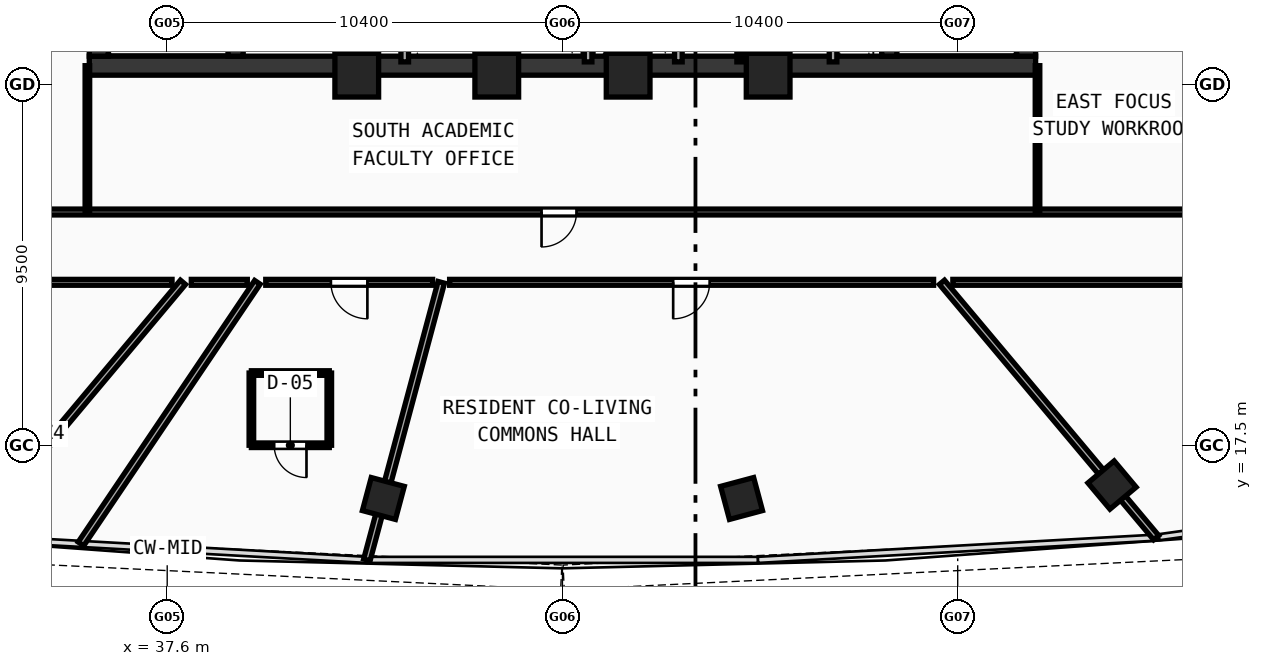
"""IFC4 building model, lengths in metres.
Left out: names, types, materials, properties, quantities, classifications, styles, units other than length and angle.
Written with IfcOpenShell. Run it as: python <this file> out.ifc"""

import sys

from ifc_helpers import new_model, si_unit, direction, frame, frame_2d, origin, origin_with_axes, origin_2d, place, context, subcontext, project, spatial, rectangle, hollow_rectangle, extrude, source, transform, mapped, element, fill, save


model = new_model("IFC4")
c1 = context("Model", 3, precision=1e-05, world=origin(), true_north=direction((0.0, 1.0)))
c2 = subcontext(c1, "Body", "Model", "MODEL_VIEW")
j1 = project(units=[si_unit("LENGTHUNIT", "METRE"), si_unit("PLANEANGLEUNIT", "RADIAN")], contexts=[c1])
p1 = place(None, origin())
s1 = spatial("IfcSite", under=j1, at=p1, CompositionType="ELEMENT")
p2 = place(p1, origin())
s2 = spatial("IfcBuilding", under=s1, at=p2, CompositionType="ELEMENT")
p3 = place(p2, frame((0.0, 0.0, 203.76)))
s3 = spatial("IfcBuildingStorey", under=s2, at=p3, CompositionType="ELEMENT", Elevation=203.76)
p4 = place(p3, frame((35.55, 27.5, 0.0), z_axis=(0.0, 0.0, 1.0), x_axis=(1.0, 0.0, 0.0)))
e1 = element("IfcWall", 1, at=p4, inside=s3, PredefinedType="SHEAR", context=c2, shape_type="SweptSolid", body=[
    extrude(rectangle(XDim=24.9, YDim=0.5, at=frame_2d((12.45, 0.0))), origin(), (0.0, 0.0, 1.0), 3.54),
])
for number, where, z_axis, x_axis in (
    (2, (35.8, 27.75, 0.0), (0.0, 0.0, 1.0), (0.0, 1.0, 0.0)),
    (3, (60.2, 27.75, 0.0), (0.0, 0.0, 1.0), (0.0, 1.0, 0.0)),
):
    element("IfcWall", number, at=place(p3, frame(where, z_axis=z_axis, x_axis=x_axis)), inside=s3, PredefinedType="SHEAR", context=c2, shape_type="SweptSolid", body=[
        extrude(rectangle(XDim=12.2, YDim=0.5, at=frame_2d((6.1, 0.0))), origin(), (0.0, 0.0, 1.0), 3.54),
    ])
p5 = place(p3, frame((39.4, 27.75, 0.0), z_axis=(0.0, 0.0, 1.0), x_axis=(0.0, 1.0, 0.0)))
e4 = element("IfcWall", 4, at=p5, inside=s3, PredefinedType="SHEAR", context=c2, shape_type="SweptSolid", body=[
    extrude(rectangle(XDim=12.2, YDim=0.4, at=frame_2d((6.1, 0.0))), origin(), (0.0, 0.0, 1.0), 3.54),
])
p6 = place(p5, frame((10.0, 0.0, 0.0)))
e5 = element("IfcOpeningElement", 5, at=p6, cuts=e4, PredefinedType="OPENING", context=c2, shape_type="SweptSolid", body=[
    extrude(rectangle(XDim=1.1, YDim=2.1, at=frame_2d((0.55, 1.05))), frame((0.0, 0.21, 0.0), z_axis=(0.0, -1.0, 0.0), x_axis=(1.0, 0.0, 0.0)), (0.0, 0.0, 1.0), 0.42),
])
p7 = place(p3, frame((56.6, 27.75, 0.0), z_axis=(0.0, 0.0, 1.0), x_axis=(0.0, 1.0, 0.0)))
e6 = element("IfcWall", 6, at=p7, inside=s3, PredefinedType="SHEAR", context=c2, shape_type="SweptSolid", body=[
    extrude(rectangle(XDim=12.2, YDim=0.4, at=frame_2d((6.1, 0.0))), origin(), (0.0, 0.0, 1.0), 3.54),
])
p8 = place(p7, frame((10.0, 0.0, 0.0)))
e7 = element("IfcOpeningElement", 7, at=p8, cuts=e6, PredefinedType="OPENING", context=c2, shape_type="SweptSolid", body=[
    extrude(rectangle(XDim=1.1, YDim=2.1, at=frame_2d((0.55, 1.05))), frame((0.0, 0.21, 0.0), z_axis=(0.0, -1.0, 0.0), x_axis=(1.0, 0.0, 0.0)), (0.0, 0.0, 1.0), 0.42),
])
m1 = source(origin(), c2, "Body", "SweptSolid", [
    extrude(hollow_rectangle(XDim=1.15, YDim=1.15, WallThickness=0.048, at=origin_2d()), origin(), (0.0, 0.0, 1.0), 3.8),
])
for number, where, z_axis, x_axis in (
    (8, (42.588, 27.25, -0.26), (0.0, 0.0, 1.0), (1.0, 0.0, 0.0)),
    (9, (46.272, 27.25, -0.26), (0.0, 0.0, 1.0), (1.0, 0.0, 0.0)),
    (10, (49.729, 27.25, -0.26), (0.0, 0.0, 1.0), (1.0, 0.0, 0.0)),
    (11, (53.412, 27.25, -0.26), (0.0, 0.0, 1.0), (1.0, 0.0, 0.0)),
):
    element("IfcColumn", number, at=place(p3, frame(where, z_axis=z_axis, x_axis=x_axis)), inside=s3, PredefinedType="COLUMN", context=c2, shape_type="MappedRepresentation", body=[
        mapped(m1, transform((0.0, 0.0, 0.0), scale=1.0)),
    ])
m2 = source(origin(), c2, "Body", "SweptSolid", [
    extrude(hollow_rectangle(XDim=0.9, YDim=0.9, WallThickness=0.036, at=origin_2d()), origin(), (0.0, 0.0, 1.0), 3.8),
])
for number, where, z_axis, x_axis in (
    (12, (43.288, 16.112, -0.26), (0.0, 0.0, 1.0), (0.966, -0.259, 0.0)),
    (13, (52.713, 16.112, -0.26), (0.0, 0.0, 1.0), (0.966, 0.259, 0.0)),
    (14, (62.461, 16.466, -0.26), (0.0, 0.0, 1.0), (0.766, 0.643, 0.0)),
):
    element("IfcColumn", number, at=place(p3, frame(where, z_axis=z_axis, x_axis=x_axis)), inside=s3, PredefinedType="COLUMN", context=c2, shape_type="MappedRepresentation", body=[
        mapped(m2, transform((0.0, 0.0, 0.0), scale=1.0)),
    ])
p9 = place(p3, frame((43.85, 27.6, 0.0), z_axis=(0.0, 0.0, 1.0), x_axis=(0.0, 1.0, 0.0)))
e15 = element("IfcWall", 15, at=p9, inside=s3, PredefinedType="SOLIDWALL", context=c2, shape_type="SweptSolid", body=[
    extrude(rectangle(XDim=6.22, YDim=0.2, at=frame_2d((3.11, 0.0))), origin(), (0.0, 0.0, 1.0), 3.54),
])
p10 = place(p9, frame((2.25, 0.0, 0.0)))
e16 = element("IfcOpeningElement", 16, at=p10, cuts=e15, PredefinedType="OPENING", context=c2, shape_type="SweptSolid", body=[
    extrude(rectangle(XDim=1.05, YDim=2.1, at=frame_2d((0.525, 1.05))), frame((0.0, 0.11, 0.0), z_axis=(0.0, -1.0, 0.0), x_axis=(1.0, 0.0, 0.0)), (0.0, 0.0, 1.0), 0.22),
])
p11 = place(p3, frame((53.68, 27.6, 0.0), z_axis=(0.0, 0.0, 1.0), x_axis=(0.0, 1.0, 0.0)))
e17 = element("IfcWall", 17, at=p11, inside=s3, PredefinedType="SOLIDWALL", context=c2, shape_type="SweptSolid", body=[
    extrude(rectangle(XDim=9.05, YDim=0.2, at=frame_2d((4.525, 0.0))), origin(), (0.0, 0.0, 1.0), 3.54),
])
p12 = place(p11, frame((6.9, 0.0, 0.0)))
e18 = element("IfcOpeningElement", 18, at=p12, cuts=e17, PredefinedType="OPENING", context=c2, shape_type="SweptSolid", body=[
    extrude(rectangle(XDim=1.05, YDim=2.1, at=frame_2d((0.525, 1.05))), frame((0.0, 0.11, 0.0), z_axis=(0.0, -1.0, 0.0), x_axis=(1.0, 0.0, 0.0)), (0.0, 0.0, 1.0), 0.22),
])
for number, where, z_axis, x_axis in (
    (19, (51.05, 27.6, 0.0), (0.0, 0.0, 1.0), (0.0, 1.0, 0.0)),
    (20, (46.225, 27.6, 0.0), (0.0, 0.0, 1.0), (0.0, 1.0, 0.0)),
    (21, (48.675, 27.6, 0.0), (0.0, 0.0, 1.0), (0.0, 1.0, 0.0)),
    (22, (55.12, 27.6, 0.0), (0.0, 0.0, 1.0), (0.0, 1.0, 0.0)),
):
    element("IfcWall", number, at=place(p3, frame(where, z_axis=z_axis, x_axis=x_axis)), inside=s3, PredefinedType="SOLIDWALL", context=c2, shape_type="SweptSolid", body=[
        extrude(rectangle(XDim=2.12, YDim=0.2, at=frame_2d((1.06, 0.0))), origin(), (0.0, 0.0, 1.0), 3.54),
    ])
p13 = place(p3, frame((42.32, 27.6, 0.0), z_axis=(0.0, 0.0, 1.0), x_axis=(0.0, 1.0, 0.0)))
e23 = element("IfcWall", 23, at=p13, inside=s3, PredefinedType="PARTITIONING", context=c2, shape_type="SweptSolid", body=[
    extrude(rectangle(XDim=5.9, YDim=0.155, at=frame_2d((2.95, 0.0))), origin(), (0.0, 0.0, 1.0), 3.54),
])
p14 = place(p13, frame((1.4, 0.0, 0.0)))
e24 = element("IfcOpeningElement", 24, at=p14, cuts=e23, PredefinedType="OPENING", context=c2, shape_type="SweptSolid", body=[
    extrude(rectangle(XDim=0.9, YDim=2.1, at=frame_2d((0.45, 1.05))), frame((0.0, 0.087, 0.0), z_axis=(0.0, -1.0, 0.0), x_axis=(1.0, 0.0, 0.0)), (0.0, 0.0, 1.0), 0.175),
])
p15 = place(p13, frame((4.45, 0.0, 0.0)))
e25 = element("IfcOpeningElement", 25, at=p15, cuts=e23, PredefinedType="OPENING", context=c2, shape_type="SweptSolid", body=[
    extrude(rectangle(XDim=0.9, YDim=2.1, at=frame_2d((0.45, 1.05))), frame((0.0, 0.087, 0.0), z_axis=(0.0, -1.0, 0.0), x_axis=(1.0, 0.0, 0.0)), (0.0, 0.0, 1.0), 0.175),
])
p16 = place(p3, frame((52.65, 27.6, 0.0), z_axis=(0.0, 0.0, 1.0), x_axis=(0.0, 1.0, 0.0)))
e26 = element("IfcWall", 26, at=p16, inside=s3, PredefinedType="PARTITIONING", context=c2, shape_type="SweptSolid", body=[
    extrude(rectangle(XDim=2.12, YDim=0.12, at=frame_2d((1.06, 0.0))), origin(), (0.0, 0.0, 1.0), 3.54),
])
p17 = place(p3, frame((31.45, 23.65, 0.0), z_axis=(0.0, 0.0, 1.0), x_axis=(1.0, 0.0, 0.0)))
e27 = element("IfcWall", 27, at=p17, inside=s3, PredefinedType="PARTITIONING", context=c2, shape_type="SweptSolid", body=[
    extrude(rectangle(XDim=33.1, YDim=0.155, at=frame_2d((16.55, 0.0))), origin(), (0.0, 0.0, 1.0), 2.89),
])
p18 = place(p17, frame((16.0, 0.0, 0.0)))
e28 = element("IfcOpeningElement", 28, at=p18, cuts=e27, PredefinedType="OPENING", context=c2, shape_type="SweptSolid", body=[
    extrude(rectangle(XDim=0.92, YDim=2.1, at=frame_2d((0.46, 1.05))), frame((0.0, 0.087, 0.0), z_axis=(0.0, -1.0, 0.0), x_axis=(1.0, 0.0, 0.0)), (0.0, 0.0, 1.0), 0.175),
])
for number, where, z_axis, x_axis in (
    (29, (35.5, 23.65, 0.0), (0.0, 0.0, 1.0), (0.0, 1.0, 0.0)),
    (30, (60.5, 23.65, 0.0), (0.0, 0.0, 1.0), (0.0, 1.0, 0.0)),
):
    element("IfcWall", number, at=place(p3, frame(where, z_axis=z_axis, x_axis=x_axis)), inside=s3, PredefinedType="PARTITIONING", context=c2, shape_type="SweptSolid", body=[
        extrude(rectangle(XDim=3.85, YDim=0.12, at=frame_2d((1.925, 0.0))), origin(), (0.0, 0.0, 1.0), 3.14),
    ])
p19 = place(p3, frame((38.015, 21.8, 0.0), z_axis=(0.0, 0.0, 1.0), x_axis=(-0.642774108653, -0.766055771629, 0.0)))
e31 = element("IfcWall", 31, at=p19, inside=s3, PredefinedType="PARTITIONING", context=c2, shape_type="SweptSolid", body=[
    extrude(rectangle(XDim=8.769, YDim=0.175, at=frame_2d((4.385, 0.0))), origin(), (0.0, 0.0, 1.0), 2.89),
])
p20 = place(p3, frame((39.973, 21.8, 0.0), z_axis=(0.0, 0.0, 1.0), x_axis=(-0.559191496738, -0.829038521406, 0.0)))
e32 = element("IfcWall", 32, at=p20, inside=s3, PredefinedType="PARTITIONING", context=c2, shape_type="SweptSolid", body=[
    extrude(rectangle(XDim=8.302, YDim=0.175, at=frame_2d((4.151, 0.0))), origin(), (0.0, 0.0, 1.0), 2.89),
])
p21 = place(p3, frame((44.811, 21.8, 0.0), z_axis=(0.0, 0.0, 1.0), x_axis=(-0.25880602585, -0.965929314693, 0.0)))
e33 = element("IfcWall", 33, at=p21, inside=s3, PredefinedType="PARTITIONING", context=c2, shape_type="SweptSolid", body=[
    extrude(rectangle(XDim=7.561, YDim=0.175, at=frame_2d((3.78, 0.0))), origin(), (0.0, 0.0, 1.0), 2.89),
])
p22 = place(p3, frame((57.985, 21.8, 0.0), z_axis=(0.0, 0.0, 1.0), x_axis=(0.642774108653, -0.766055771629, 0.0)))
e34 = element("IfcWall", 34, at=p22, inside=s3, PredefinedType="PARTITIONING", context=c2, shape_type="SweptSolid", body=[
    extrude(rectangle(XDim=8.769, YDim=0.175, at=frame_2d((4.385, 0.0))), origin(), (0.0, 0.0, 1.0), 2.89),
])
p23 = place(p3, frame((66.4, 21.8, 0.0), z_axis=(0.0, 0.0, 1.0), x_axis=(-1.0, 0.0, 0.0)))
e35 = element("IfcWall", 35, at=p23, inside=s3, PredefinedType="PARTITIONING", context=c2, shape_type="SweptSolid", body=[
    extrude(rectangle(XDim=8.127, YDim=0.155, at=frame_2d((4.064, 0.0))), origin(), (0.0, 0.0, 1.0), 3.14),
])
p24 = place(p3, frame((57.765, 21.8, 0.0), z_axis=(0.0, 0.0, 1.0), x_axis=(-1.0, 0.0, 0.0)))
e36 = element("IfcWall", 36, at=p24, inside=s3, PredefinedType="PARTITIONING", context=c2, shape_type="SweptSolid", body=[
    extrude(rectangle(XDim=12.734, YDim=0.155, at=frame_2d((6.367, 0.0))), origin(), (0.0, 0.0, 1.0), 2.89),
])
p25 = place(p24, frame((5.892, 0.0, 0.0)))
e37 = element("IfcOpeningElement", 37, at=p25, cuts=e36, PredefinedType="OPENING", context=c2, shape_type="SweptSolid", body=[
    extrude(rectangle(XDim=0.96, YDim=2.12, at=frame_2d((0.48, 1.06))), frame((0.0, 0.087, 0.0), z_axis=(0.0, -1.0, 0.0), x_axis=(1.0, 0.0, 0.0)), (0.0, 0.0, 1.0), 0.175),
])
p26 = place(p3, frame((44.583, 21.8, 0.0), z_axis=(0.0, 0.0, 1.0), x_axis=(-1.0, 0.0, 0.0)))
e38 = element("IfcWall", 38, at=p26, inside=s3, PredefinedType="PARTITIONING", context=c2, shape_type="SweptSolid", body=[
    extrude(rectangle(XDim=4.39, YDim=0.155, at=frame_2d((2.195, 0.0))), origin(), (0.0, 0.0, 1.0), 3.54),
])
p27 = place(p26, frame((1.716, 0.0, 0.0)))
e39 = element("IfcOpeningElement", 39, at=p27, cuts=e38, PredefinedType="OPENING", context=c2, shape_type="SweptSolid", body=[
    extrude(rectangle(XDim=0.96, YDim=2.12, at=frame_2d((0.48, 1.06))), frame((0.0, 0.087, 0.0), z_axis=(0.0, -1.0, 0.0), x_axis=(1.0, 0.0, 0.0)), (0.0, 0.0, 1.0), 0.175),
])
p28 = place(p3, frame((39.708, 21.8, 0.0), z_axis=(0.0, 0.0, 1.0), x_axis=(-1.0, 0.0, 0.0)))
e40 = element("IfcWall", 40, at=p28, inside=s3, PredefinedType="PARTITIONING", context=c2, shape_type="SweptSolid", body=[
    extrude(rectangle(XDim=1.473, YDim=0.155, at=frame_2d((0.737, 0.0))), origin(), (0.0, 0.0, 1.0), 2.89),
])
p29 = place(p3, frame((37.728, 21.8, 0.0), z_axis=(0.0, 0.0, 1.0), x_axis=(-1.0, 0.0, 0.0)))
e41 = element("IfcWall", 41, at=p29, inside=s3, PredefinedType="PARTITIONING", context=c2, shape_type="SweptSolid", body=[
    extrude(rectangle(XDim=8.127, YDim=0.155, at=frame_2d((4.064, 0.0))), origin(), (0.0, 0.0, 1.0), 3.14),
])
p30 = place(p3, frame((39.815, 17.513, 0.0), z_axis=(0.0, 0.0, 1.0), x_axis=(1.0, 0.0, 0.0)))
e42 = element("IfcWall", 42, at=p30, inside=s3, PredefinedType="PARTITIONING", context=c2, shape_type="SweptSolid", body=[
    extrude(rectangle(XDim=2.05, YDim=0.12, at=frame_2d((1.025, 0.0))), origin(), (0.0, 0.0, 1.0), 3.54),
])
p31 = place(p30, frame((0.6, 0.0, 0.0)))
e43 = element("IfcOpeningElement", 43, at=p31, cuts=e42, PredefinedType="OPENING", context=c2, shape_type="SweptSolid", body=[
    extrude(rectangle(XDim=0.85, YDim=2.1, at=frame_2d((0.425, 1.05))), frame((0.0, 0.07, 0.0), z_axis=(0.0, -1.0, 0.0), x_axis=(1.0, 0.0, 0.0)), (0.0, 0.0, 1.0), 0.14),
])
p32 = place(p3, frame((41.865, 17.513, 0.0), z_axis=(0.0, 0.0, 1.0), x_axis=(0.0, 1.0, 0.0)))
e44 = element("IfcWall", 44, at=p32, inside=s3, PredefinedType="PARTITIONING", context=c2, shape_type="SweptSolid", body=[
    extrude(rectangle(XDim=1.9, YDim=0.12, at=frame_2d((0.95, 0.0))), origin(), (0.0, 0.0, 1.0), 3.54),
])
p33 = place(p3, frame((41.865, 19.413, 0.0), z_axis=(0.0, 0.0, 1.0), x_axis=(-1.0, 0.0, 0.0)))
e45 = element("IfcWall", 45, at=p33, inside=s3, PredefinedType="PARTITIONING", context=c2, shape_type="SweptSolid", body=[
    extrude(rectangle(XDim=2.05, YDim=0.12, at=frame_2d((1.025, 0.0))), origin(), (0.0, 0.0, 1.0), 3.54),
])
p34 = place(p3, frame((39.815, 19.413, 0.0), z_axis=(0.0, 0.0, 1.0), x_axis=(0.0, -1.0, 0.0)))
e46 = element("IfcWall", 46, at=p34, inside=s3, PredefinedType="PARTITIONING", context=c2, shape_type="SweptSolid", body=[
    extrude(rectangle(XDim=1.9, YDim=0.12, at=frame_2d((0.95, 0.0))), origin(), (0.0, 0.0, 1.0), 3.54),
])
m3 = source(origin(), c2, "Body", "SweptSolid", [
    extrude(rectangle(XDim=0.92, YDim=2.1, at=frame_2d((0.46, 1.05))), frame((0.0, 0.025, 0.0), z_axis=(0.0, -1.0, 0.0), x_axis=(1.0, 0.0, 0.0)), (0.0, 0.0, 1.0), 0.05),
])
p35 = place(p18, frame((0.92, 0.0, 0.0), z_axis=(0.0, 0.0, 1.0), x_axis=(-1.0, 0.0, 0.0)))
e47 = element("IfcDoor", 47, at=p35, inside=s3, OperationType="SINGLE_SWING_RIGHT", PredefinedType="DOOR", context=c2, shape_type="MappedRepresentation", body=[
    mapped(m3, transform((0.0, 0.0, 0.0), scale=1.0)),
])
fill(e28, e47)
m4 = source(origin(), c2, "Body", "SweptSolid", [
    extrude(rectangle(XDim=0.96, YDim=2.12, at=frame_2d((0.48, 1.06))), frame((0.0, 0.025, 0.0), z_axis=(0.0, -1.0, 0.0), x_axis=(1.0, 0.0, 0.0)), (0.0, 0.0, 1.0), 0.05),
])
p36 = place(p27, origin_with_axes())
e48 = element("IfcDoor", 48, at=p36, inside=s3, OperationType="SINGLE_SWING_LEFT", PredefinedType="DOOR", context=c2, shape_type="MappedRepresentation", body=[
    mapped(m4, transform((0.0, 0.0, 0.0), scale=1.0)),
])
fill(e39, e48)
m5 = source(origin(), c2, "Body", "SweptSolid", [
    extrude(rectangle(XDim=0.85, YDim=2.1, at=frame_2d((0.425, 1.05))), frame((0.0, 0.025, 0.0), z_axis=(0.0, -1.0, 0.0), x_axis=(1.0, 0.0, 0.0)), (0.0, 0.0, 1.0), 0.05),
])
p37 = place(p31, frame((0.85, 0.0, 0.0), z_axis=(0.0, 0.0, 1.0), x_axis=(-1.0, 0.0, 0.0)))
e49 = element("IfcDoor", 49, at=p37, inside=s3, OperationType="SINGLE_SWING_LEFT", PredefinedType="DOOR", context=c2, shape_type="MappedRepresentation", body=[
    mapped(m5, transform((0.0, 0.0, 0.0), scale=1.0)),
])
fill(e43, e49)
p38 = place(p25, origin_with_axes())
e50 = element("IfcDoor", 50, at=p38, inside=s3, OperationType="SINGLE_SWING_RIGHT", PredefinedType="DOOR", context=c2, shape_type="MappedRepresentation", body=[
    mapped(m4, transform((0.0, 0.0, 0.0), scale=1.0)),
])
fill(e37, e50)
save(model, sys.argv[1])
